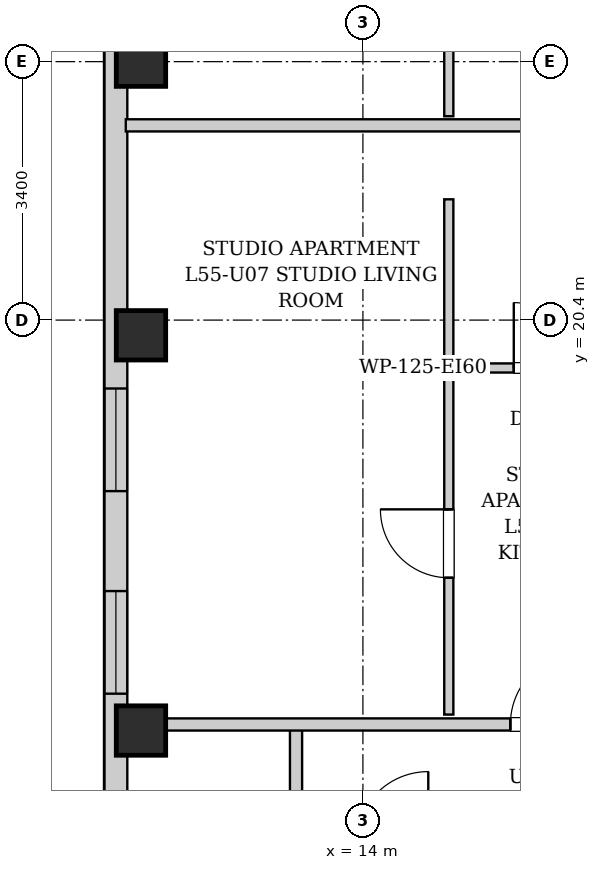
"""IFC4 building model, lengths in metres.
Left out: names, types, materials, properties, quantities, classifications, styles, units other than length and angle.
Written with IfcOpenShell. Run it as: python <this file> out.ifc"""

import sys

from ifc_helpers import new_model, si_unit, direction, frame, frame_2d, origin, origin_2d, place, context, subcontext, project, spatial, rectangle, extrude, element, fill, save


model = new_model("IFC4")
c1 = context("Model", 3, precision=1e-05, world=origin(), true_north=direction((0.0, 1.0)))
c2 = subcontext(c1, "Body", "Model", "MODEL_VIEW")
j1 = project(units=[si_unit("LENGTHUNIT", "METRE"), si_unit("PLANEANGLEUNIT", "RADIAN")], contexts=[c1])
p1 = place(None, origin())
s1 = spatial("IfcSite", under=j1, at=p1, CompositionType="ELEMENT")
p2 = place(p1, origin())
s2 = spatial("IfcBuilding", under=s1, at=p2, CompositionType="ELEMENT")
p3 = place(p2, frame((0.0, 0.0, 190.9)))
s3 = spatial("IfcBuildingStorey", under=s2, at=p3, CompositionType="ELEMENT", Elevation=190.9)
for number, where, z_axis, x_axis in (
    (1, (11.08, 15.0, 0.0), (0.0, 0.0, 1.0), (1.0, 0.0, 0.0)),
    (2, (11.08, 20.2, 0.0), (0.0, 0.0, 1.0), (1.0, 0.0, 0.0)),
    (3, (11.08, 23.8, 0.0), (0.0, 0.0, 1.0), (1.0, 0.0, 0.0)),
):
    element("IfcColumn", number, at=place(p3, frame(where, z_axis=z_axis, x_axis=x_axis)), inside=s3, PredefinedType="COLUMN", context=c2, shape_type="SweptSolid", body=[
        extrude(rectangle(XDim=0.65, YDim=0.65, at=origin_2d()), origin(), (0.0, 0.0, 1.0), 3.3),
    ])
p4 = place(p3, frame((10.75, 6.3, 0.0), z_axis=(0.0, 0.0, 1.0), x_axis=(0.0, 1.0, 0.0)))
e4 = element("IfcWall", 4, at=p4, inside=s3, PredefinedType="SOLIDWALL", context=c2, shape_type="SweptSolid", body=[
    extrude(rectangle(XDim=31.4, YDim=0.3, at=frame_2d((15.7, 0.0))), origin(), (0.0, 0.0, 1.0), 3.04),
])
p5 = place(p4, frame((1.504, 0.0, 0.55)))
e5 = element("IfcOpeningElement", 5, at=p5, cuts=e4, PredefinedType="OPENING", context=c2, shape_type="SweptSolid", body=[
    extrude(rectangle(XDim=1.35, YDim=1.2, at=frame_2d((0.675, 0.6))), frame((0.0, 0.16, 0.0), z_axis=(0.0, -1.0, 0.0), x_axis=(1.0, 0.0, 0.0)), (0.0, 0.0, 1.0), 0.32),
])
p6 = place(p4, frame((28.546, 0.0, 0.55)))
e6 = element("IfcOpeningElement", 6, at=p6, cuts=e4, PredefinedType="OPENING", context=c2, shape_type="SweptSolid", body=[
    extrude(rectangle(XDim=1.35, YDim=1.2, at=frame_2d((0.675, 0.6))), frame((0.0, 0.16, 0.0), z_axis=(0.0, -1.0, 0.0), x_axis=(1.0, 0.0, 0.0)), (0.0, 0.0, 1.0), 0.32),
])
p7 = place(p4, frame((11.85, 0.0, 0.55)))
e7 = element("IfcOpeningElement", 7, at=p7, cuts=e4, PredefinedType="OPENING", context=c2, shape_type="SweptSolid", body=[
    extrude(rectangle(XDim=1.35, YDim=1.2, at=frame_2d((0.675, 0.6))), frame((0.0, 0.16, 0.0), z_axis=(0.0, -1.0, 0.0), x_axis=(1.0, 0.0, 0.0)), (0.0, 0.0, 1.0), 0.32),
])
p8 = place(p4, frame((9.185, 0.0, 0.55)))
e8 = element("IfcOpeningElement", 8, at=p8, cuts=e4, PredefinedType="OPENING", context=c2, shape_type="SweptSolid", body=[
    extrude(rectangle(XDim=1.35, YDim=1.2, at=frame_2d((0.675, 0.6))), frame((0.0, 0.16, 0.0), z_axis=(0.0, -1.0, 0.0), x_axis=(1.0, 0.0, 0.0)), (0.0, 0.0, 1.0), 0.32),
])
p9 = place(p4, frame((19.006, 0.0, 0.55)))
e9 = element("IfcOpeningElement", 9, at=p9, cuts=e4, PredefinedType="OPENING", context=c2, shape_type="SweptSolid", body=[
    extrude(rectangle(XDim=1.35, YDim=1.2, at=frame_2d((0.675, 0.6))), frame((0.0, 0.16, 0.0), z_axis=(0.0, -1.0, 0.0), x_axis=(1.0, 0.0, 0.0)), (0.0, 0.0, 1.0), 0.32),
])
p10 = place(p4, frame((20.616, 0.0, 0.55)))
e10 = element("IfcOpeningElement", 10, at=p10, cuts=e4, PredefinedType="OPENING", context=c2, shape_type="SweptSolid", body=[
    extrude(rectangle(XDim=1.35, YDim=1.2, at=frame_2d((0.675, 0.6))), frame((0.0, 0.16, 0.0), z_axis=(0.0, -1.0, 0.0), x_axis=(1.0, 0.0, 0.0)), (0.0, 0.0, 1.0), 0.32),
])
p11 = place(p3, frame((13.12, 13.51, 0.0), z_axis=(0.0, 0.0, 1.0), x_axis=(0.0, 1.0, 0.0)))
e11 = element("IfcWall", 11, at=p11, inside=s3, PredefinedType="PARTITIONING", context=c2, shape_type="SweptSolid", body=[
    extrude(rectangle(XDim=1.58, YDim=0.16, at=frame_2d((0.79, 0.0))), origin(), (0.0, 0.0, 1.0), 3.04),
])
p12 = place(p3, frame((10.88, 15.08, 0.0), z_axis=(0.0, 0.0, 1.0), x_axis=(1.0, 0.0, 0.0)))
e12 = element("IfcWall", 12, at=p12, inside=s3, PredefinedType="PARTITIONING", context=c2, shape_type="SweptSolid", body=[
    extrude(rectangle(XDim=6.88, YDim=0.16, at=frame_2d((3.44, 0.0))), origin(), (0.0, 0.0, 1.0), 2.556),
])
p13 = place(p12, frame((5.06, 0.0, 0.0)))
e13 = element("IfcOpeningElement", 13, at=p13, cuts=e12, PredefinedType="OPENING", context=c2, shape_type="SweptSolid", body=[
    extrude(rectangle(XDim=0.95, YDim=2.1, at=frame_2d((0.475, 1.05))), frame((0.0, 0.09, 0.0), z_axis=(0.0, -1.0, 0.0), x_axis=(1.0, 0.0, 0.0)), (0.0, 0.0, 1.0), 0.18),
])
p14 = place(p3, frame((10.88, 22.962, 0.0), z_axis=(0.0, 0.0, 1.0), x_axis=(1.0, 0.0, 0.0)))
e14 = element("IfcWall", 14, at=p14, inside=s3, PredefinedType="PARTITIONING", context=c2, shape_type="SweptSolid", body=[
    extrude(rectangle(XDim=6.76, YDim=0.16, at=frame_2d((3.38, 0.0))), origin(), (0.0, 0.0, 1.0), 3.04),
])
p15 = place(p3, frame((15.19, 19.77, 0.0), z_axis=(0.0, 0.0, 1.0), x_axis=(1.0, 0.0, 0.0)))
e15 = element("IfcWall", 15, at=p15, inside=s3, PredefinedType="PARTITIONING", context=c2, shape_type="SweptSolid", body=[
    extrude(rectangle(XDim=2.45, YDim=0.12, at=frame_2d((1.225, 0.0))), origin(), (0.0, 0.0, 1.0), 3.04),
])
p16 = place(p15, frame((0.795, 0.0, 0.0)))
e16 = element("IfcOpeningElement", 16, at=p16, cuts=e15, PredefinedType="OPENING", context=c2, shape_type="SweptSolid", body=[
    extrude(rectangle(XDim=0.86, YDim=2.05, at=frame_2d((0.43, 1.025))), frame((0.0, 0.07, 0.0), z_axis=(0.0, -1.0, 0.0), x_axis=(1.0, 0.0, 0.0)), (0.0, 0.0, 1.0), 0.14),
])
p17 = place(p3, frame((15.13, 19.83, 0.0), z_axis=(0.0, 0.0, 1.0), x_axis=(0.0, 1.0, 0.0)))
e17 = element("IfcWall", 17, at=p17, inside=s3, PredefinedType="PARTITIONING", context=c2, shape_type="SweptSolid", body=[
    extrude(rectangle(XDim=2.159, YDim=0.12, at=frame_2d((1.08, 0.0))), origin(), (0.0, 0.0, 1.0), 3.04),
])
p18 = place(p3, frame((15.13, 15.21, 0.0), z_axis=(0.0, 0.0, 1.0), x_axis=(0.0, 1.0, 0.0)))
e18 = element("IfcWall", 18, at=p18, inside=s3, PredefinedType="PARTITIONING", context=c2, shape_type="SweptSolid", body=[
    extrude(rectangle(XDim=4.5, YDim=0.12, at=frame_2d((2.25, 0.0))), origin(), (0.0, 0.0, 1.0), 3.04),
])
p19 = place(p18, frame((1.8, 0.0, 0.0)))
e19 = element("IfcOpeningElement", 19, at=p19, cuts=e18, PredefinedType="OPENING", context=c2, shape_type="SweptSolid", body=[
    extrude(rectangle(XDim=0.9, YDim=2.05, at=frame_2d((0.45, 1.025))), frame((0.0, 0.07, 0.0), z_axis=(0.0, -1.0, 0.0), x_axis=(1.0, 0.0, 0.0)), (0.0, 0.0, 1.0), 0.14),
])
p20 = place(p3, frame((15.13, 23.082, 0.0), z_axis=(0.0, 0.0, 1.0), x_axis=(0.0, 1.0, 0.0)))
e20 = element("IfcWall", 20, at=p20, inside=s3, PredefinedType="PARTITIONING", context=c2, shape_type="SweptSolid", body=[
    extrude(rectangle(XDim=1.85, YDim=0.12, at=frame_2d((0.925, 0.0))), origin(), (0.0, 0.0, 1.0), 3.04),
])
p21 = place(p13, origin())
e21 = element("IfcDoor", 21, at=p21, inside=s3, OperationType="SINGLE_SWING_RIGHT", PredefinedType="DOOR", context=c2, shape_type="SweptSolid", body=[
    extrude(rectangle(XDim=0.95, YDim=2.1, at=frame_2d((0.475, 1.05))), frame((0.0, 0.025, 0.0), z_axis=(0.0, -1.0, 0.0), x_axis=(1.0, 0.0, 0.0)), (0.0, 0.0, 1.0), 0.05),
])
fill(e13, e21)
p22 = place(p16, origin())
e22 = element("IfcDoor", 22, at=p22, inside=s3, OperationType="SINGLE_SWING_LEFT", PredefinedType="DOOR", context=c2, shape_type="SweptSolid", body=[
    extrude(rectangle(XDim=0.86, YDim=2.05, at=frame_2d((0.43, 1.025))), frame((0.0, 0.025, 0.0), z_axis=(0.0, -1.0, 0.0), x_axis=(1.0, 0.0, 0.0)), (0.0, 0.0, 1.0), 0.05),
])
fill(e16, e22)
p23 = place(p19, origin())
e23 = element("IfcDoor", 23, at=p23, inside=s3, OperationType="SINGLE_SWING_RIGHT", PredefinedType="DOOR", context=c2, shape_type="SweptSolid", body=[
    extrude(rectangle(XDim=0.9, YDim=2.05, at=frame_2d((0.45, 1.025))), frame((0.0, 0.025, 0.0), z_axis=(0.0, -1.0, 0.0), x_axis=(1.0, 0.0, 0.0)), (0.0, 0.0, 1.0), 0.05),
])
fill(e19, e23)
p24 = place(p7, origin())
e24 = element("IfcWindow", 24, at=p24, inside=s3, PartitioningType="SINGLE_PANEL", PredefinedType="WINDOW", context=c2, shape_type="SweptSolid", body=[
    extrude(rectangle(XDim=1.35, YDim=1.2, at=frame_2d((0.675, 0.6))), frame((0.0, 0.03, 0.0), z_axis=(0.0, -1.0, 0.0), x_axis=(1.0, 0.0, 0.0)), (0.0, 0.0, 1.0), 0.06),
])
fill(e7, e24)
p25 = place(p8, origin())
e25 = element("IfcWindow", 25, at=p25, inside=s3, PartitioningType="SINGLE_PANEL", PredefinedType="WINDOW", context=c2, shape_type="SweptSolid", body=[
    extrude(rectangle(XDim=1.35, YDim=1.2, at=frame_2d((0.675, 0.6))), frame((0.0, 0.03, 0.0), z_axis=(0.0, -1.0, 0.0), x_axis=(1.0, 0.0, 0.0)), (0.0, 0.0, 1.0), 0.06),
])
fill(e8, e25)
save(model, sys.argv[1])
